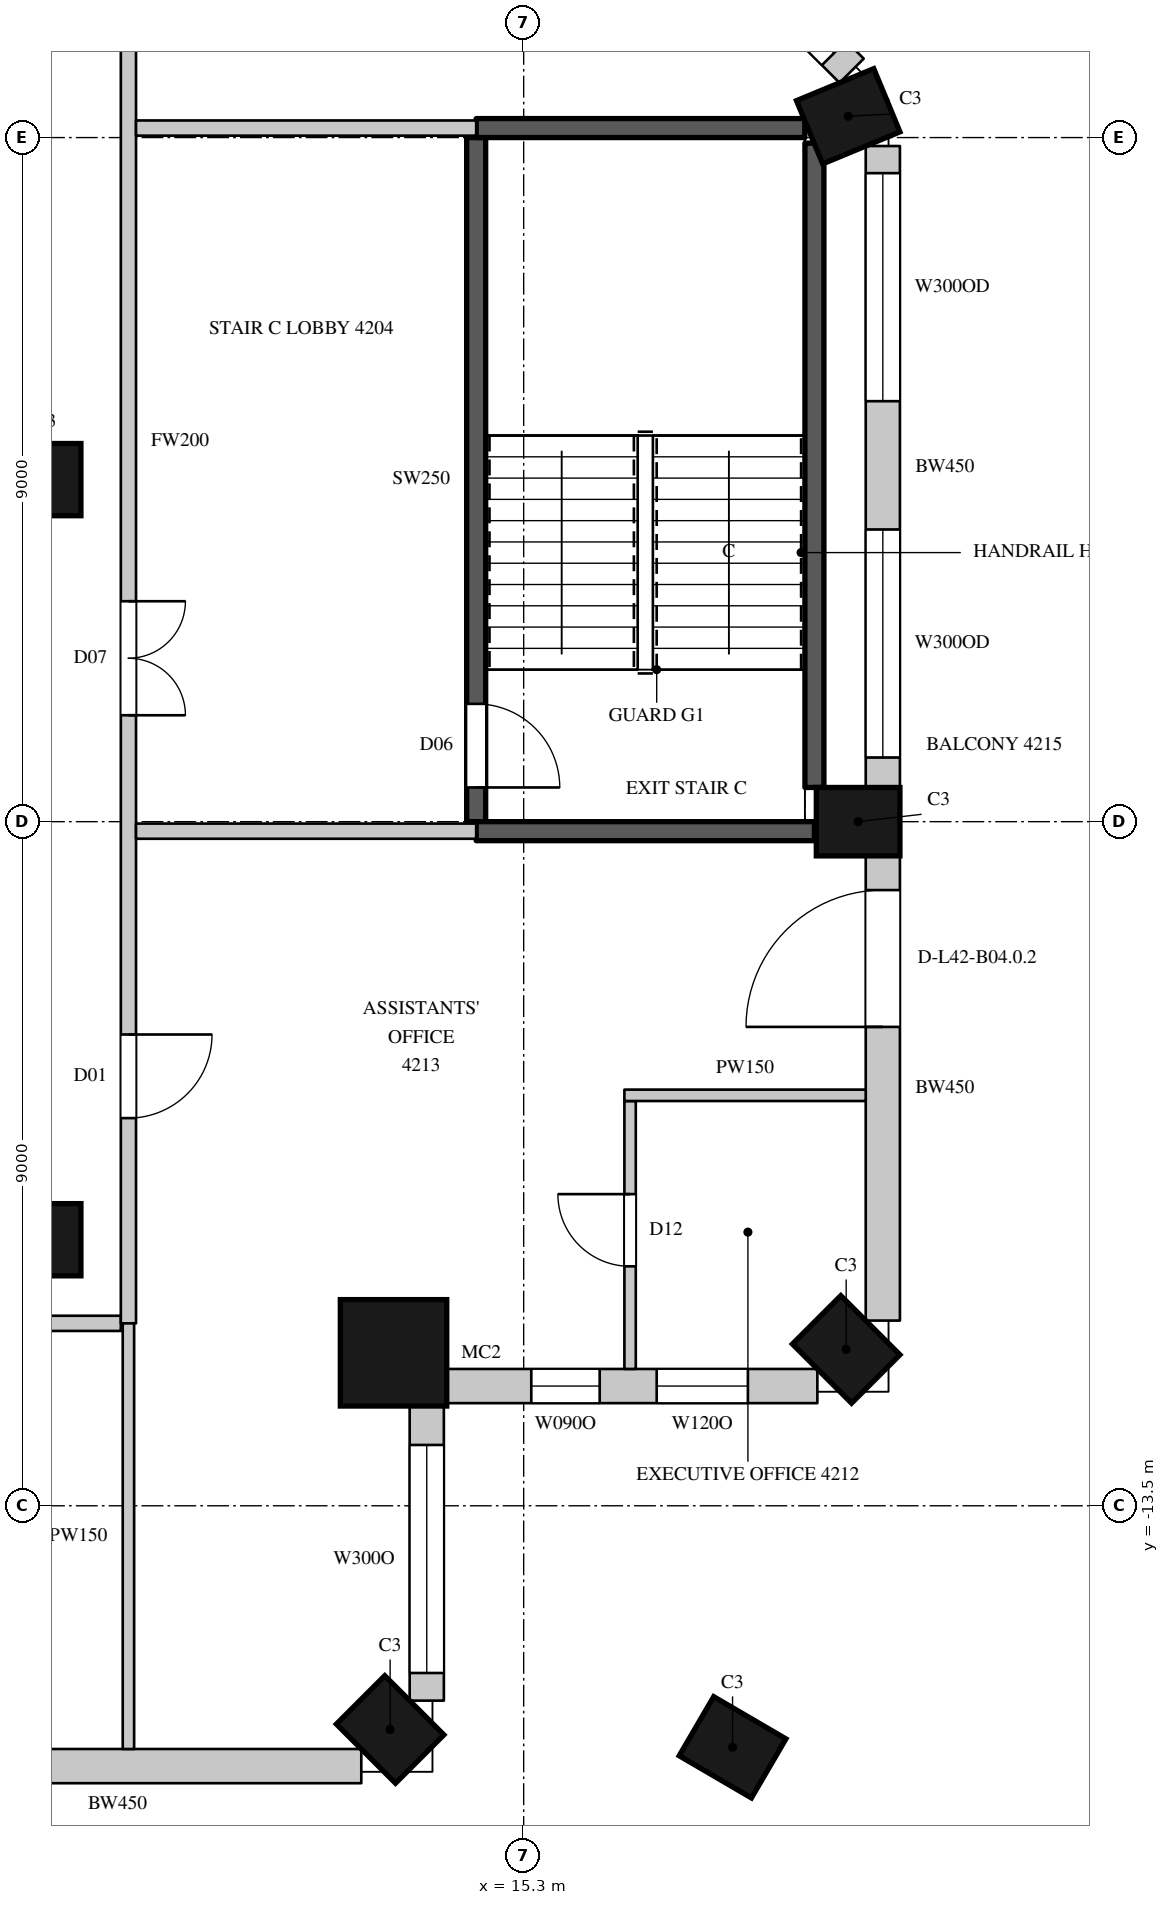
"""IFC4 building model, lengths in metres.
Left out: names, types, materials, properties, quantities, classifications, styles, units other than length and angle.
Written with IfcOpenShell. Run it as: python <this file> out.ifc"""

import sys

from ifc_helpers import new_model, si_unit, direction, frame, frame_2d, origin, origin_2d, place, context, subcontext, project, spatial, rectangle, circle, extrude, element, fill, save


model = new_model("IFC4")
c1 = context("Model", 3, precision=1e-05, world=origin(), true_north=direction((0.0, 1.0)))
c2 = subcontext(c1, "Body", "Model", "MODEL_VIEW")
j1 = project(units=[si_unit("LENGTHUNIT", "METRE"), si_unit("PLANEANGLEUNIT", "RADIAN")], contexts=[c1])
p1 = place(None, origin())
s1 = spatial("IfcSite", under=j1, at=p1, CompositionType="ELEMENT")
p2 = place(p1, origin())
s2 = spatial("IfcBuilding", under=s1, at=p2, CompositionType="ELEMENT")
p3 = place(p2, frame((0.0, 0.0, 193.3)))
s3 = spatial("IfcBuildingStorey", under=s2, at=p3, CompositionType="ELEMENT", Elevation=193.3)
p4 = place(p3, frame((13.543, -16.443, 0.0), z_axis=(0.0, 0.0, 1.0), x_axis=(0.707106781187, 0.707106781187, 0.0)))
e1 = element("IfcColumn", 1, at=p4, inside=s3, PredefinedType="COLUMN", context=c2, shape_type="SweptSolid", body=[
    extrude(rectangle(XDim=0.9, YDim=1.1, at=origin_2d()), origin(), (0.0, 0.0, 1.0), 4.1),
])
p5 = place(p3, frame((13.588, -11.488, 0.0), z_axis=(0.0, 0.0, 1.0), x_axis=(1.0, 0.0, 0.0)))
e2 = element("IfcColumn", 2, at=p5, inside=s3, PredefinedType="COLUMN", context=c2, shape_type="SweptSolid", body=[
    extrude(circle(Radius=0.7, at=origin_2d()), origin(), (0.0, 0.0, 1.0), 4.1),
])
for number, where, z_axis, x_axis in (
    (3, (19.543, -11.443, 0.0), (0.0, 0.0, 1.0), (0.707, 0.707, 0.0)),
    (4, (19.7, -4.5, 0.0), (0.0, 0.0, 1.0), (0.0, 1.0, 0.0)),
    (5, (19.57, 4.78, 0.0), (0.0, 0.0, 1.0), (-0.383, 0.924, 0.0)),
    (6, (18.048, -16.677, 0.0), (0.0, 0.0, 1.0), (0.504, 0.863, 0.0)),
):
    element("IfcColumn", number, at=place(p3, frame(where, z_axis=z_axis, x_axis=x_axis)), inside=s3, PredefinedType="COLUMN", context=c2, shape_type="SweptSolid", body=[
        extrude(rectangle(XDim=0.9, YDim=1.1, at=origin_2d()), origin(), (0.0, 0.0, 1.0), 4.1),
    ])
for number, where, z_axis, x_axis in (
    (7, (9.0, -10.0, 0.0), (0.0, 0.0, 1.0), (1.0, 0.0, 0.0)),
    (8, (9.0, 0.0, 0.0), (0.0, 0.0, 1.0), (1.0, 0.0, 0.0)),
):
    element("IfcColumn", number, at=place(p3, frame(where, z_axis=z_axis, x_axis=x_axis)), inside=s3, PredefinedType="COLUMN", context=c2, shape_type="SweptSolid", body=[
        extrude(circle(Radius=0.475, at=origin_2d()), origin(), (0.0, 0.0, 1.0), 4.1),
    ])
p6 = place(p3, frame((6.75, -16.925, 0.0), z_axis=(0.0, 0.0, 1.0), x_axis=(1.0, 0.0, 0.0)))
e9 = element("IfcWall", 9, at=p6, inside=s3, PredefinedType="SOLIDWALL", context=c2, shape_type="SweptSolid", body=[
    extrude(rectangle(XDim=6.414, YDim=0.45, at=frame_2d((3.207, 0.0))), origin(), (0.0, 0.0, 1.0), 3.8),
])
p7 = place(p6, frame((0.525, 0.0, 0.0)))
e10 = element("IfcOpeningElement", 10, at=p7, cuts=e9, PredefinedType="OPENING", context=c2, shape_type="SweptSolid", body=[
    extrude(rectangle(XDim=1.8, YDim=2.4, at=frame_2d((0.9, 1.2))), frame((0.0, 0.235, 0.0), z_axis=(0.0, -1.0, 0.0), x_axis=(1.0, 0.0, 0.0)), (0.0, 0.0, 1.0), 0.47),
])
p8 = place(p3, frame((14.025, -16.064, 0.0), z_axis=(0.0, 0.0, 1.0), x_axis=(0.0, 1.0, 0.0)))
e11 = element("IfcWall", 11, at=p8, inside=s3, PredefinedType="SOLIDWALL", context=c2, shape_type="SweptSolid", body=[
    extrude(rectangle(XDim=3.909, YDim=0.45, at=frame_2d((1.955, 0.0))), origin(), (0.0, 0.0, 1.0), 3.8),
])
p9 = place(p8, frame((0.364, 0.0, 1.05)))
e12 = element("IfcOpeningElement", 12, at=p9, cuts=e11, PredefinedType="OPENING", context=c2, shape_type="SweptSolid", body=[
    extrude(rectangle(XDim=3.0, YDim=2.4, at=frame_2d((1.5, 1.2))), frame((0.0, 0.235, 0.0), z_axis=(0.0, -1.0, 0.0), x_axis=(1.0, 0.0, 0.0)), (0.0, 0.0, 1.0), 0.47),
])
p10 = place(p3, frame((14.255, -11.925, 0.0), z_axis=(0.0, 0.0, 1.0), x_axis=(1.0, 0.0, 0.0)))
e13 = element("IfcWall", 13, at=p10, inside=s3, PredefinedType="SOLIDWALL", context=c2, shape_type="SweptSolid", body=[
    extrude(rectangle(XDim=4.909, YDim=0.45, at=frame_2d((2.455, 0.0))), origin(), (0.0, 0.0, 1.0), 3.8),
])
p11 = place(p10, frame((1.146, 0.0, 1.05)))
e14 = element("IfcOpeningElement", 14, at=p11, cuts=e13, PredefinedType="OPENING", context=c2, shape_type="SweptSolid", body=[
    extrude(rectangle(XDim=0.9, YDim=2.4, at=frame_2d((0.45, 1.2))), frame((0.0, 0.235, 0.0), z_axis=(0.0, -1.0, 0.0), x_axis=(1.0, 0.0, 0.0)), (0.0, 0.0, 1.0), 0.47),
])
p12 = place(p10, frame((2.795, 0.0, 1.05)))
e15 = element("IfcOpeningElement", 15, at=p12, cuts=e13, PredefinedType="OPENING", context=c2, shape_type="SweptSolid", body=[
    extrude(rectangle(XDim=1.2, YDim=2.4, at=frame_2d((0.6, 1.2))), frame((0.0, 0.235, 0.0), z_axis=(0.0, -1.0, 0.0), x_axis=(1.0, 0.0, 0.0)), (0.0, 0.0, 1.0), 0.47),
])
p13 = place(p3, frame((20.025, -11.064, 0.0), z_axis=(0.0, 0.0, 1.0), x_axis=(0.0, 1.0, 0.0)))
e16 = element("IfcWall", 16, at=p13, inside=s3, PredefinedType="SOLIDWALL", context=c2, shape_type="SweptSolid", body=[
    extrude(rectangle(XDim=6.114, YDim=0.45, at=frame_2d((3.057, 0.0))), origin(), (0.0, 0.0, 1.0), 3.8),
])
p14 = place(p13, frame((3.864, 0.0, 0.0)))
e17 = element("IfcOpeningElement", 17, at=p14, cuts=e16, PredefinedType="OPENING", context=c2, shape_type="SweptSolid", body=[
    extrude(rectangle(XDim=1.8, YDim=2.4, at=frame_2d((0.9, 1.2))), frame((0.0, 0.235, 0.0), z_axis=(0.0, -1.0, 0.0), x_axis=(1.0, 0.0, 0.0)), (0.0, 0.0, 1.0), 0.47),
])
p15 = place(p3, frame((20.025, -4.05, 0.0), z_axis=(0.0, 0.0, 1.0), x_axis=(0.0, 1.0, 0.0)))
e18 = element("IfcWall", 18, at=p15, inside=s3, PredefinedType="SOLIDWALL", context=c2, shape_type="SweptSolid", body=[
    extrude(rectangle(XDim=8.439, YDim=0.45, at=frame_2d((4.219, 0.0))), origin(), (0.0, 0.0, 1.0), 3.8),
])
p16 = place(p15, frame((0.394, 0.0, 1.05)))
e19 = element("IfcOpeningElement", 19, at=p16, cuts=e18, PredefinedType="OPENING", context=c2, shape_type="SweptSolid", body=[
    extrude(rectangle(XDim=3.0, YDim=2.4, at=frame_2d((1.5, 1.2))), frame((0.0, 0.235, 0.0), z_axis=(0.0, -1.0, 0.0), x_axis=(1.0, 0.0, 0.0)), (0.0, 0.0, 1.0), 0.47),
])
p17 = place(p15, frame((5.082, 0.0, 1.05)))
e20 = element("IfcOpeningElement", 20, at=p17, cuts=e18, PredefinedType="OPENING", context=c2, shape_type="SweptSolid", body=[
    extrude(rectangle(XDim=3.0, YDim=2.4, at=frame_2d((1.5, 1.2))), frame((0.0, 0.235, 0.0), z_axis=(0.0, -1.0, 0.0), x_axis=(1.0, 0.0, 0.0)), (0.0, 0.0, 1.0), 0.47),
])
p18 = place(p3, frame((19.615, 5.379, 0.0), z_axis=(0.0, 0.0, 1.0), x_axis=(-0.707089646058, 0.7071239159, 0.0)))
e21 = element("IfcWall", 21, at=p18, inside=s3, PredefinedType="SOLIDWALL", context=c2, shape_type="SweptSolid", body=[
    extrude(rectangle(XDim=7.124, YDim=0.45, at=frame_2d((3.562, 0.0))), origin(), (0.0, 0.0, 1.0), 3.8),
])
p19 = place(p18, frame((0.328, 0.0, 1.05)))
e22 = element("IfcOpeningElement", 22, at=p19, cuts=e21, PredefinedType="OPENING", context=c2, shape_type="SweptSolid", body=[
    extrude(rectangle(XDim=2.4, YDim=2.4, at=frame_2d((1.2, 1.2))), frame((0.0, 0.235, 0.0), z_axis=(0.0, -1.0, 0.0), x_axis=(1.0, 0.0, 0.0)), (0.0, 0.0, 1.0), 0.47),
])
p20 = place(p18, frame((4.359, 0.0, 1.05)))
e23 = element("IfcOpeningElement", 23, at=p20, cuts=e21, PredefinedType="OPENING", context=c2, shape_type="SweptSolid", body=[
    extrude(rectangle(XDim=2.4, YDim=2.4, at=frame_2d((1.2, 1.2))), frame((0.0, 0.235, 0.0), z_axis=(0.0, -1.0, 0.0), x_axis=(1.0, 0.0, 0.0)), (0.0, 0.0, 1.0), 0.47),
])
p21 = place(p3, frame((-10.9, -11.1, 0.0), z_axis=(0.0, 0.0, 1.0), x_axis=(1.0, 0.0, 0.0)))
e24 = element("IfcWall", 24, at=p21, inside=s3, PredefinedType="PARTITIONING", context=c2, shape_type="SweptSolid", body=[
    extrude(rectangle(XDim=20.9, YDim=0.2, at=frame_2d((10.45, 0.0))), origin(), (0.0, 0.0, 1.0), 3.8),
])
p22 = place(p21, frame((1.1, 0.0, 0.0)))
e25 = element("IfcOpeningElement", 25, at=p22, cuts=e24, PredefinedType="OPENING", context=c2, shape_type="SweptSolid", body=[
    extrude(rectangle(XDim=0.9, YDim=2.2, at=frame_2d((0.45, 1.1))), frame((0.0, 0.11, 0.0), z_axis=(0.0, -1.0, 0.0), x_axis=(1.0, 0.0, 0.0)), (0.0, 0.0, 1.0), 0.22),
])
p23 = place(p21, frame((4.9, 0.0, 0.0)))
e26 = element("IfcOpeningElement", 26, at=p23, cuts=e24, PredefinedType="OPENING", context=c2, shape_type="SweptSolid", body=[
    extrude(rectangle(XDim=0.9, YDim=2.2, at=frame_2d((0.45, 1.1))), frame((0.0, 0.11, 0.0), z_axis=(0.0, -1.0, 0.0), x_axis=(1.0, 0.0, 0.0)), (0.0, 0.0, 1.0), 0.22),
])
p24 = place(p21, frame((7.25, 0.0, 0.0)))
e27 = element("IfcOpeningElement", 27, at=p24, cuts=e24, PredefinedType="OPENING", context=c2, shape_type="SweptSolid", body=[
    extrude(rectangle(XDim=0.9, YDim=2.2, at=frame_2d((0.45, 1.1))), frame((0.0, 0.11, 0.0), z_axis=(0.0, -1.0, 0.0), x_axis=(1.0, 0.0, 0.0)), (0.0, 0.0, 1.0), 0.22),
])
p25 = place(p21, frame((9.95, 0.0, 0.0)))
e28 = element("IfcOpeningElement", 28, at=p25, cuts=e24, PredefinedType="OPENING", context=c2, shape_type="SweptSolid", body=[
    extrude(rectangle(XDim=1.1, YDim=2.4, at=frame_2d((0.55, 1.2))), frame((0.0, 0.11, 0.0), z_axis=(0.0, -1.0, 0.0), x_axis=(1.0, 0.0, 0.0)), (0.0, 0.0, 1.0), 0.22),
])
p26 = place(p21, frame((16.3, 0.0, 0.0)))
e29 = element("IfcOpeningElement", 29, at=p26, cuts=e24, PredefinedType="OPENING", context=c2, shape_type="SweptSolid", body=[
    extrude(rectangle(XDim=1.1, YDim=2.4, at=frame_2d((0.55, 1.2))), frame((0.0, 0.11, 0.0), z_axis=(0.0, -1.0, 0.0), x_axis=(1.0, 0.0, 0.0)), (0.0, 0.0, 1.0), 0.22),
])
p27 = place(p3, frame((10.1, -11.1, 0.0), z_axis=(0.0, 0.0, 1.0), x_axis=(0.0, 1.0, 0.0)))
e30 = element("IfcWall", 30, at=p27, inside=s3, PredefinedType="PARTITIONING", context=c2, shape_type="SweptSolid", body=[
    extrude(rectangle(XDim=23.2, YDim=0.2, at=frame_2d((11.6, 0.0))), origin(), (0.0, 0.0, 1.0), 3.8),
])
p28 = place(p27, frame((8.0, 0.0, 0.0)))
e31 = element("IfcOpeningElement", 31, at=p28, cuts=e30, PredefinedType="OPENING", context=c2, shape_type="SweptSolid", body=[
    extrude(rectangle(XDim=1.5, YDim=2.4, at=frame_2d((0.75, 1.2))), frame((0.0, 0.11, 0.0), z_axis=(0.0, -1.0, 0.0), x_axis=(1.0, 0.0, 0.0)), (0.0, 0.0, 1.0), 0.22),
])
p29 = place(p27, frame((18.95, 0.0, 0.0)))
e32 = element("IfcOpeningElement", 32, at=p29, cuts=e30, PredefinedType="OPENING", context=c2, shape_type="SweptSolid", body=[
    extrude(rectangle(XDim=1.1, YDim=2.4, at=frame_2d((0.55, 1.2))), frame((0.0, 0.11, 0.0), z_axis=(0.0, -1.0, 0.0), x_axis=(1.0, 0.0, 0.0)), (0.0, 0.0, 1.0), 0.22),
])
p30 = place(p27, frame((2.7, 0.0, 0.0)))
e33 = element("IfcOpeningElement", 33, at=p30, cuts=e30, PredefinedType="OPENING", context=c2, shape_type="SweptSolid", body=[
    extrude(rectangle(XDim=1.1, YDim=2.4, at=frame_2d((0.55, 1.2))), frame((0.0, 0.11, 0.0), z_axis=(0.0, -1.0, 0.0), x_axis=(1.0, 0.0, 0.0)), (0.0, 0.0, 1.0), 0.22),
])
for number, where, z_axis, x_axis in (
    (34, (10.2, -4.625, 0.0), (0.0, 0.0, 1.0), (1.0, 0.0, 0.0)),
    (35, (10.2, 4.625, 0.0), (0.0, 0.0, 1.0), (1.0, 0.0, 0.0)),
):
    element("IfcWall", number, at=place(p3, frame(where, z_axis=z_axis, x_axis=x_axis)), inside=s3, PredefinedType="PARTITIONING", context=c2, shape_type="SweptSolid", body=[
        extrude(rectangle(XDim=4.475, YDim=0.2, at=frame_2d((2.238, 0.0))), origin(), (0.0, 0.0, 1.0), 3.8),
    ])
p31 = place(p3, frame((10.1, -16.7, 0.0), z_axis=(0.0, 0.0, 1.0), x_axis=(0.0, 1.0, 0.0)))
e36 = element("IfcWall", 36, at=p31, inside=s3, PredefinedType="PARTITIONING", context=c2, shape_type="SweptSolid", body=[
    extrude(rectangle(XDim=5.6, YDim=0.15, at=frame_2d((2.8, 0.0))), origin(), (0.0, 0.0, 1.0), 3.8),
])
p32 = place(p3, frame((16.7, -11.7, 0.0), z_axis=(0.0, 0.0, 1.0), x_axis=(0.0, 1.0, 0.0)))
e37 = element("IfcWall", 37, at=p32, inside=s3, PredefinedType="PARTITIONING", context=c2, shape_type="SweptSolid", body=[
    extrude(rectangle(XDim=3.525, YDim=0.15, at=frame_2d((1.762, 0.0))), origin(), (0.0, 0.0, 1.0), 3.8),
])
p33 = place(p32, frame((1.35, 0.0, 0.0)))
e38 = element("IfcOpeningElement", 38, at=p33, cuts=e37, PredefinedType="OPENING", context=c2, shape_type="SweptSolid", body=[
    extrude(rectangle(XDim=0.95, YDim=2.2, at=frame_2d((0.475, 1.1))), frame((0.0, 0.085, 0.0), z_axis=(0.0, -1.0, 0.0), x_axis=(1.0, 0.0, 0.0)), (0.0, 0.0, 1.0), 0.17),
])
p34 = place(p3, frame((16.625, -8.1, 0.0), z_axis=(0.0, 0.0, 1.0), x_axis=(1.0, 0.0, 0.0)))
e39 = element("IfcWall", 39, at=p34, inside=s3, PredefinedType="PARTITIONING", context=c2, shape_type="SweptSolid", body=[
    extrude(rectangle(XDim=3.175, YDim=0.15, at=frame_2d((1.587, 0.0))), origin(), (0.0, 0.0, 1.0), 3.15),
])
p35 = place(p3, frame((14.675, -4.5, 0.0), z_axis=(0.0, 0.0, 1.0), x_axis=(0.0, 1.0, 0.0)))
e40 = element("IfcWall", 40, at=p35, inside=s3, PredefinedType="SHEAR", context=c2, shape_type="SweptSolid", body=[
    extrude(rectangle(XDim=9.0, YDim=0.25, at=frame_2d((4.5, 0.0))), origin(), (0.0, 0.0, 1.0), 3.8),
])
p36 = place(p35, frame((0.45, 0.0, 0.0)))
e41 = element("IfcOpeningElement", 41, at=p36, cuts=e40, PredefinedType="OPENING", context=c2, shape_type="SweptSolid", body=[
    extrude(rectangle(XDim=1.1, YDim=2.2, at=frame_2d((0.55, 1.1))), frame((0.0, 0.135, 0.0), z_axis=(0.0, -1.0, 0.0), x_axis=(1.0, 0.0, 0.0)), (0.0, 0.0, 1.0), 0.27),
])
p37 = place(p3, frame((14.675, -4.625, 0.0), z_axis=(0.0, 0.0, 1.0), x_axis=(1.0, 0.0, 0.0)))
e42 = element("IfcWall", 42, at=p37, inside=s3, PredefinedType="SHEAR", context=c2, shape_type="SweptSolid", body=[
    extrude(rectangle(XDim=4.45, YDim=0.25, at=frame_2d((2.225, 0.0))), origin(), (0.0, 0.0, 1.0), 3.8),
])
p38 = place(p3, frame((14.675, 4.625, 0.0), z_axis=(0.0, 0.0, 1.0), x_axis=(1.0, 0.0, 0.0)))
e43 = element("IfcWall", 43, at=p38, inside=s3, PredefinedType="SHEAR", context=c2, shape_type="SweptSolid", body=[
    extrude(rectangle(XDim=4.324, YDim=0.25, at=frame_2d((2.162, 0.0))), origin(), (0.0, 0.0, 1.0), 3.8),
])
p39 = place(p3, frame((19.125, -4.05, 0.0), z_axis=(0.0, 0.0, 1.0), x_axis=(0.0, 1.0, 0.0)))
e44 = element("IfcWall", 44, at=p39, inside=s3, PredefinedType="SHEAR", context=c2, shape_type="SweptSolid", body=[
    extrude(rectangle(XDim=8.477, YDim=0.25, at=frame_2d((4.238, 0.0))), origin(), (0.0, 0.0, 1.0), 3.8),
])
p40 = place(p9, origin())
e45 = element("IfcWindow", 45, at=p40, inside=s3, PartitioningType="SINGLE_PANEL", PredefinedType="WINDOW", context=c2, shape_type="SweptSolid", body=[
    extrude(rectangle(XDim=3.0, YDim=2.4, at=frame_2d((1.5, 1.2))), frame((0.0, 0.135, 0.0), z_axis=(0.0, -1.0, 0.0), x_axis=(1.0, 0.0, 0.0)), (0.0, 0.0, 1.0), 0.06),
])
fill(e12, e45)
p41 = place(p14, origin())
e46 = element("IfcDoor", 46, at=p41, inside=s3, OperationType="SLIDING_TO_LEFT", PredefinedType="DOOR", context=c2, shape_type="SweptSolid", body=[
    extrude(rectangle(XDim=1.8, YDim=2.4, at=frame_2d((0.9, 1.2))), frame((0.0, 0.13, 0.0), z_axis=(0.0, -1.0, 0.0), x_axis=(1.0, 0.0, 0.0)), (0.0, 0.0, 1.0), 0.05),
])
fill(e17, e46)
p42 = place(p16, origin())
e47 = element("IfcWindow", 47, at=p42, inside=s3, PartitioningType="SINGLE_PANEL", PredefinedType="WINDOW", context=c2, shape_type="SweptSolid", body=[
    extrude(rectangle(XDim=3.0, YDim=2.4, at=frame_2d((1.5, 1.2))), frame((0.0, 0.135, 0.0), z_axis=(0.0, -1.0, 0.0), x_axis=(1.0, 0.0, 0.0)), (0.0, 0.0, 1.0), 0.06),
])
fill(e19, e47)
p43 = place(p17, origin())
e48 = element("IfcWindow", 48, at=p43, inside=s3, PartitioningType="SINGLE_PANEL", PredefinedType="WINDOW", context=c2, shape_type="SweptSolid", body=[
    extrude(rectangle(XDim=3.0, YDim=2.4, at=frame_2d((1.5, 1.2))), frame((0.0, 0.135, 0.0), z_axis=(0.0, -1.0, 0.0), x_axis=(1.0, 0.0, 0.0)), (0.0, 0.0, 1.0), 0.06),
])
fill(e20, e48)
p44 = place(p19, origin())
e49 = element("IfcWindow", 49, at=p44, inside=s3, PartitioningType="SINGLE_PANEL", PredefinedType="WINDOW", context=c2, shape_type="SweptSolid", body=[
    extrude(rectangle(XDim=2.4, YDim=2.4, at=frame_2d((1.2, 1.2))), frame((0.0, 0.135, 0.0), z_axis=(0.0, -1.0, 0.0), x_axis=(1.0, 0.0, 0.0)), (0.0, 0.0, 1.0), 0.06),
])
fill(e22, e49)
p45 = place(p28, origin())
e50 = element("IfcDoor", 50, at=p45, inside=s3, OperationType="DOUBLE_DOOR_SINGLE_SWING", PredefinedType="DOOR", context=c2, shape_type="SweptSolid", body=[
    extrude(rectangle(XDim=1.5, YDim=2.4, at=frame_2d((0.75, 1.2))), frame((0.0, 0.025, 0.0), z_axis=(0.0, -1.0, 0.0), x_axis=(1.0, 0.0, 0.0)), (0.0, 0.0, 1.0), 0.05),
])
fill(e31, e50)
p46 = place(p30, origin())
e51 = element("IfcDoor", 51, at=p46, inside=s3, OperationType="SINGLE_SWING_LEFT", PredefinedType="DOOR", context=c2, shape_type="SweptSolid", body=[
    extrude(rectangle(XDim=1.1, YDim=2.4, at=frame_2d((0.55, 1.2))), frame((0.0, 0.025, 0.0), z_axis=(0.0, -1.0, 0.0), x_axis=(1.0, 0.0, 0.0)), (0.0, 0.0, 1.0), 0.05),
])
fill(e33, e51)
p47 = place(p33, origin())
e52 = element("IfcDoor", 52, at=p47, inside=s3, OperationType="SINGLE_SWING_RIGHT", PredefinedType="DOOR", context=c2, shape_type="SweptSolid", body=[
    extrude(rectangle(XDim=0.95, YDim=2.2, at=frame_2d((0.475, 1.1))), frame((0.0, 0.025, 0.0), z_axis=(0.0, -1.0, 0.0), x_axis=(1.0, 0.0, 0.0)), (0.0, 0.0, 1.0), 0.05),
])
fill(e38, e52)
p48 = place(p36, origin())
e53 = element("IfcDoor", 53, at=p48, inside=s3, OperationType="SINGLE_SWING_RIGHT", PredefinedType="DOOR", context=c2, shape_type="SweptSolid", body=[
    extrude(rectangle(XDim=1.1, YDim=2.2, at=frame_2d((0.55, 1.1))), frame((0.0, 0.025, 0.0), z_axis=(0.0, -1.0, 0.0), x_axis=(1.0, 0.0, 0.0)), (0.0, 0.0, 1.0), 0.05),
])
fill(e41, e53)
p49 = place(p11, origin())
e54 = element("IfcWindow", 54, at=p49, inside=s3, PartitioningType="SINGLE_PANEL", PredefinedType="WINDOW", context=c2, shape_type="SweptSolid", body=[
    extrude(rectangle(XDim=0.9, YDim=2.4, at=frame_2d((0.45, 1.2))), frame((0.0, 0.135, 0.0), z_axis=(0.0, -1.0, 0.0), x_axis=(1.0, 0.0, 0.0)), (0.0, 0.0, 1.0), 0.06),
])
fill(e14, e54)
p50 = place(p12, origin())
e55 = element("IfcWindow", 55, at=p50, inside=s3, PartitioningType="SINGLE_PANEL", PredefinedType="WINDOW", context=c2, shape_type="SweptSolid", body=[
    extrude(rectangle(XDim=1.2, YDim=2.4, at=frame_2d((0.6, 1.2))), frame((0.0, 0.135, 0.0), z_axis=(0.0, -1.0, 0.0), x_axis=(1.0, 0.0, 0.0)), (0.0, 0.0, 1.0), 0.06),
])
fill(e15, e55)
save(model, sys.argv[1])
